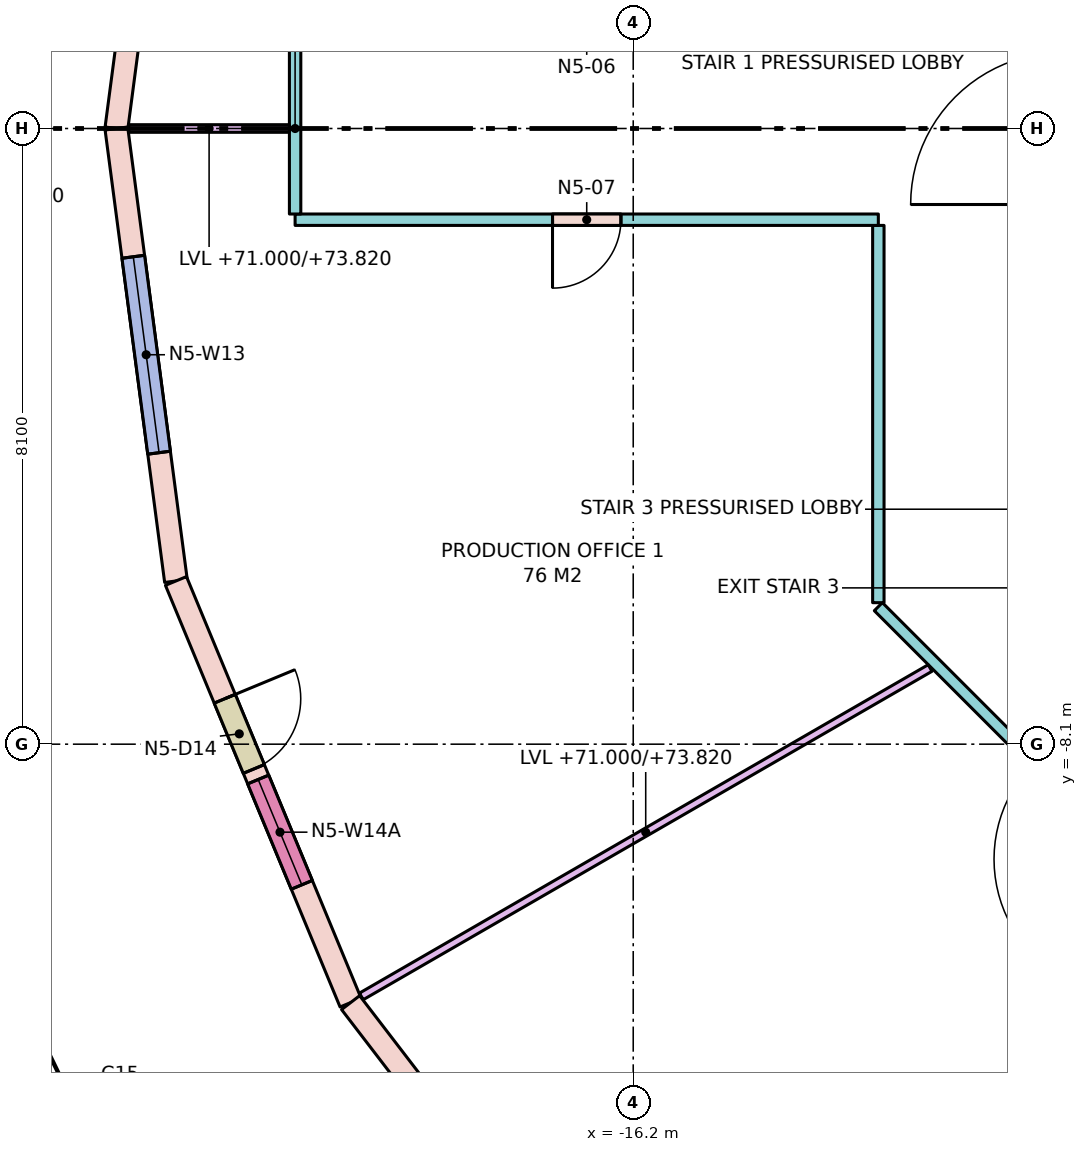
"""IFC4 building model, lengths in metres.
Left out: names, types, materials, properties, quantities, classifications, styles, units other than length and angle.
Written with IfcOpenShell. Run it as: python <this file> out.ifc"""

import sys

from ifc_helpers import new_model, si_unit, direction, frame, frame_2d, origin, place, context, subcontext, project, spatial, rectangle, extrude, element, fill, save


model = new_model("IFC4")
c1 = context("Model", 3, precision=1e-05, world=origin(), true_north=direction((0.0, 1.0)))
c2 = subcontext(c1, "Body", "Model", "MODEL_VIEW")
j1 = project(units=[si_unit("LENGTHUNIT", "METRE"), si_unit("PLANEANGLEUNIT", "RADIAN")], contexts=[c1])
p1 = place(None, origin())
s1 = spatial("IfcSite", under=j1, at=p1, CompositionType="ELEMENT")
p2 = place(p1, origin())
s2 = spatial("IfcBuilding", under=s1, at=p2, CompositionType="ELEMENT")
p3 = place(p2, frame((0.0, 0.0, 71.0)))
s3 = spatial("IfcBuildingStorey", under=s2, at=p3, CompositionType="ELEMENT", Elevation=71.0)
p4 = place(p3, frame((-22.216, 5.953, 0.0), z_axis=(0.0, 0.0, 1.0), x_axis=(-0.130522880875, -0.991445297315, 0.0)))
e1 = element("IfcWall", 1, at=p4, inside=s3, PredefinedType="STANDARD", context=c2, shape_type="SweptSolid", body=[
    extrude(rectangle(XDim=6.004, YDim=0.3, at=frame_2d((3.002, 0.0))), origin(), (0.0, 0.0, 1.0), 3.72),
])
p5 = place(p4, frame((1.677, 0.0, 0.0)))
e2 = element("IfcOpeningElement", 2, at=p5, cuts=e1, PredefinedType="OPENING", context=c2, shape_type="SweptSolid", body=[
    extrude(rectangle(XDim=1.0, YDim=2.4, at=frame_2d((0.5, 1.2))), frame((0.0, 0.16, 0.0), z_axis=(0.0, -1.0, 0.0), x_axis=(1.0, 0.0, 0.0)), (0.0, 0.0, 1.0), 0.32),
])
p6 = place(p4, frame((2.827, 0.0, 0.8)))
e3 = element("IfcOpeningElement", 3, at=p6, cuts=e1, PredefinedType="OPENING", context=c2, shape_type="SweptSolid", body=[
    extrude(rectangle(XDim=1.5, YDim=2.7, at=frame_2d((0.75, 1.35))), frame((0.0, 0.16, 0.0), z_axis=(0.0, -1.0, 0.0), x_axis=(1.0, 0.0, 0.0)), (0.0, 0.0, 1.0), 0.32),
])
p7 = place(p3, frame((-23.0, 0.0, 0.0), z_axis=(0.0, 0.0, 1.0), x_axis=(0.130522880875, -0.991445297315, 0.0)))
e4 = element("IfcWall", 4, at=p7, inside=s3, PredefinedType="STANDARD", context=c2, shape_type="SweptSolid", body=[
    extrude(rectangle(XDim=6.004, YDim=0.3, at=frame_2d((3.002, 0.0))), origin(), (0.0, 0.0, 1.0), 3.72),
])
p8 = place(p7, frame((1.702, 0.0, 0.8)))
e5 = element("IfcOpeningElement", 5, at=p8, cuts=e4, PredefinedType="OPENING", context=c2, shape_type="SweptSolid", body=[
    extrude(rectangle(XDim=2.6, YDim=2.7, at=frame_2d((1.3, 1.35))), frame((0.0, 0.16, 0.0), z_axis=(0.0, -1.0, 0.0), x_axis=(1.0, 0.0, 0.0)), (0.0, 0.0, 1.0), 0.32),
])
p9 = place(p3, frame((-22.216, -5.953, 0.0), z_axis=(0.0, 0.0, 1.0), x_axis=(0.382671411433, -0.923884511653, 0.0)))
e6 = element("IfcWall", 6, at=p9, inside=s3, PredefinedType="STANDARD", context=c2, shape_type="SweptSolid", body=[
    extrude(rectangle(XDim=6.004, YDim=0.3, at=frame_2d((3.002, 0.0))), origin(), (0.0, 0.0, 1.0), 3.72),
])
p10 = place(p9, frame((1.677, 0.0, 0.0)))
e7 = element("IfcOpeningElement", 7, at=p10, cuts=e6, PredefinedType="OPENING", context=c2, shape_type="SweptSolid", body=[
    extrude(rectangle(XDim=1.0, YDim=2.4, at=frame_2d((0.5, 1.2))), frame((0.0, 0.16, 0.0), z_axis=(0.0, -1.0, 0.0), x_axis=(1.0, 0.0, 0.0)), (0.0, 0.0, 1.0), 0.32),
])
p11 = place(p9, frame((2.827, 0.0, 0.8)))
e8 = element("IfcOpeningElement", 8, at=p11, cuts=e6, PredefinedType="OPENING", context=c2, shape_type="SweptSolid", body=[
    extrude(rectangle(XDim=1.5, YDim=2.7, at=frame_2d((0.75, 1.35))), frame((0.0, 0.16, 0.0), z_axis=(0.0, -1.0, 0.0), x_axis=(1.0, 0.0, 0.0)), (0.0, 0.0, 1.0), 0.32),
])
p12 = place(p3, frame((-19.919, -11.5, 0.0), z_axis=(0.0, 0.0, 1.0), x_axis=(0.608778912074, -0.793339924758, 0.0)))
e9 = element("IfcWall", 9, at=p12, inside=s3, PredefinedType="STANDARD", context=c2, shape_type="SweptSolid", body=[
    extrude(rectangle(XDim=6.004, YDim=0.3, at=frame_2d((3.002, 0.0))), origin(), (0.0, 0.0, 1.0), 3.72),
])
p13 = place(p12, frame((1.702, 0.0, 0.8)))
e10 = element("IfcOpeningElement", 10, at=p13, cuts=e9, PredefinedType="OPENING", context=c2, shape_type="SweptSolid", body=[
    extrude(rectangle(XDim=2.6, YDim=2.7, at=frame_2d((1.3, 1.35))), frame((0.0, 0.16, 0.0), z_axis=(0.0, -1.0, 0.0), x_axis=(1.0, 0.0, 0.0)), (0.0, 0.0, 1.0), 0.32),
])
p14 = place(p3, frame((-8.328, -10.938, 0.0), z_axis=(0.0, 0.0, 1.0), x_axis=(-0.707125355289, 0.707088206597, 0.0)))
e11 = element("IfcWall", 11, at=p14, inside=s3, PredefinedType="PARTITIONING", context=c2, shape_type="SweptSolid", body=[
    extrude(rectangle(XDim=6.572, YDim=0.15, at=frame_2d((3.286, 0.0))), origin(), (0.0, 0.0, 1.0), 2.82),
])
p15 = place(p14, frame((1.874, 0.0, 0.0)))
e12 = element("IfcOpeningElement", 12, at=p15, cuts=e11, PredefinedType="OPENING", context=c2, shape_type="SweptSolid", body=[
    extrude(rectangle(XDim=1.8, YDim=2.1, at=frame_2d((0.9, 1.05))), frame((0.0, 0.085, 0.0), z_axis=(0.0, -1.0, 0.0), x_axis=(1.0, 0.0, 0.0)), (0.0, 0.0, 1.0), 0.17),
])
p16 = place(p3, frame((-12.975, -6.238, 0.0), z_axis=(0.0, 0.0, 1.0), x_axis=(0.0, 1.0, 0.0)))
e13 = element("IfcWall", 13, at=p16, inside=s3, PredefinedType="PARTITIONING", context=c2, shape_type="SweptSolid", body=[
    extrude(rectangle(XDim=4.963, YDim=0.15, at=frame_2d((2.482, 0.0))), origin(), (0.0, 0.0, 1.0), 2.82),
])
p17 = place(p3, frame((-12.975, -1.2, 0.0), z_axis=(0.0, 0.0, 1.0), x_axis=(-1.0, 0.0, 0.0)))
e14 = element("IfcWall", 14, at=p17, inside=s3, PredefinedType="PARTITIONING", context=c2, shape_type="SweptSolid", body=[
    extrude(rectangle(XDim=7.674, YDim=0.15, at=frame_2d((3.837, 0.0))), origin(), (0.0, 0.0, 1.0), 3.72),
])
p18 = place(p17, frame((3.387, 0.0, 0.0)))
e15 = element("IfcOpeningElement", 15, at=p18, cuts=e14, PredefinedType="OPENING", context=c2, shape_type="SweptSolid", body=[
    extrude(rectangle(XDim=0.9, YDim=2.1, at=frame_2d((0.45, 1.05))), frame((0.0, 0.085, 0.0), z_axis=(0.0, -1.0, 0.0), x_axis=(1.0, 0.0, 0.0)), (0.0, 0.0, 1.0), 0.17),
])
p19 = place(p3, frame((-20.649, -1.125, 0.0), z_axis=(0.0, 0.0, 1.0), x_axis=(0.0, 1.0, 0.0)))
e16 = element("IfcWall", 16, at=p19, inside=s3, PredefinedType="PARTITIONING", context=c2, shape_type="SweptSolid", body=[
    extrude(rectangle(XDim=2.25, YDim=0.15, at=frame_2d((1.125, 0.0))), origin(), (0.0, 0.0, 1.0), 2.82),
])
p20 = place(p3, frame((-20.724, 0.0, 0.0), z_axis=(0.0, 0.0, 1.0), x_axis=(-1.0, 0.0, 0.0)))
e17 = element("IfcWall", 17, at=p20, inside=s3, PredefinedType="PARTITIONING", context=c2, shape_type="SweptSolid", body=[
    extrude(rectangle(XDim=2.113, YDim=0.1, at=frame_2d((1.057, 0.0))), origin(), (0.0, 0.0, 1.0), 2.82),
])
p21 = place(p3, frame((-12.294, -7.098, 0.0), z_axis=(0.0, 0.0, 1.0), x_axis=(-0.866010547425, -0.500025731086, 0.0)))
e18 = element("IfcWall", 18, at=p21, inside=s3, PredefinedType="PARTITIONING", context=c2, shape_type="SweptSolid", body=[
    extrude(rectangle(XDim=8.641, YDim=0.1, at=frame_2d((4.32, 0.0))), origin(), (0.0, 0.0, 1.0), 2.82),
])
p22 = place(p8, origin())
e19 = element("IfcWindow", 19, at=p22, inside=s3, PartitioningType="SINGLE_PANEL", PredefinedType="WINDOW", context=c2, shape_type="SweptSolid", body=[
    extrude(rectangle(XDim=2.6, YDim=2.7, at=frame_2d((1.3, 1.35))), frame((0.0, 0.03, 0.0), z_axis=(0.0, -1.0, 0.0), x_axis=(1.0, 0.0, 0.0)), (0.0, 0.0, 1.0), 0.06),
])
fill(e5, e19)
p23 = place(p10, origin())
e20 = element("IfcDoor", 20, at=p23, inside=s3, OperationType="SINGLE_SWING_LEFT", PredefinedType="DOOR", context=c2, shape_type="SweptSolid", body=[
    extrude(rectangle(XDim=1.0, YDim=2.4, at=frame_2d((0.5, 1.2))), frame((0.0, 0.025, 0.0), z_axis=(0.0, -1.0, 0.0), x_axis=(1.0, 0.0, 0.0)), (0.0, 0.0, 1.0), 0.05),
])
fill(e7, e20)
p24 = place(p11, origin())
e21 = element("IfcWindow", 21, at=p24, inside=s3, PartitioningType="SINGLE_PANEL", PredefinedType="WINDOW", context=c2, shape_type="SweptSolid", body=[
    extrude(rectangle(XDim=1.5, YDim=2.7, at=frame_2d((0.75, 1.35))), frame((0.0, 0.03, 0.0), z_axis=(0.0, -1.0, 0.0), x_axis=(1.0, 0.0, 0.0)), (0.0, 0.0, 1.0), 0.06),
])
fill(e8, e21)
p25 = place(p18, origin())
e22 = element("IfcDoor", 22, at=p25, inside=s3, OperationType="SINGLE_SWING_RIGHT", PredefinedType="DOOR", context=c2, shape_type="SweptSolid", body=[
    extrude(rectangle(XDim=0.9, YDim=2.1, at=frame_2d((0.45, 1.05))), frame((0.0, 0.025, 0.0), z_axis=(0.0, -1.0, 0.0), x_axis=(1.0, 0.0, 0.0)), (0.0, 0.0, 1.0), 0.05),
])
fill(e15, e22)
save(model, sys.argv[1])
